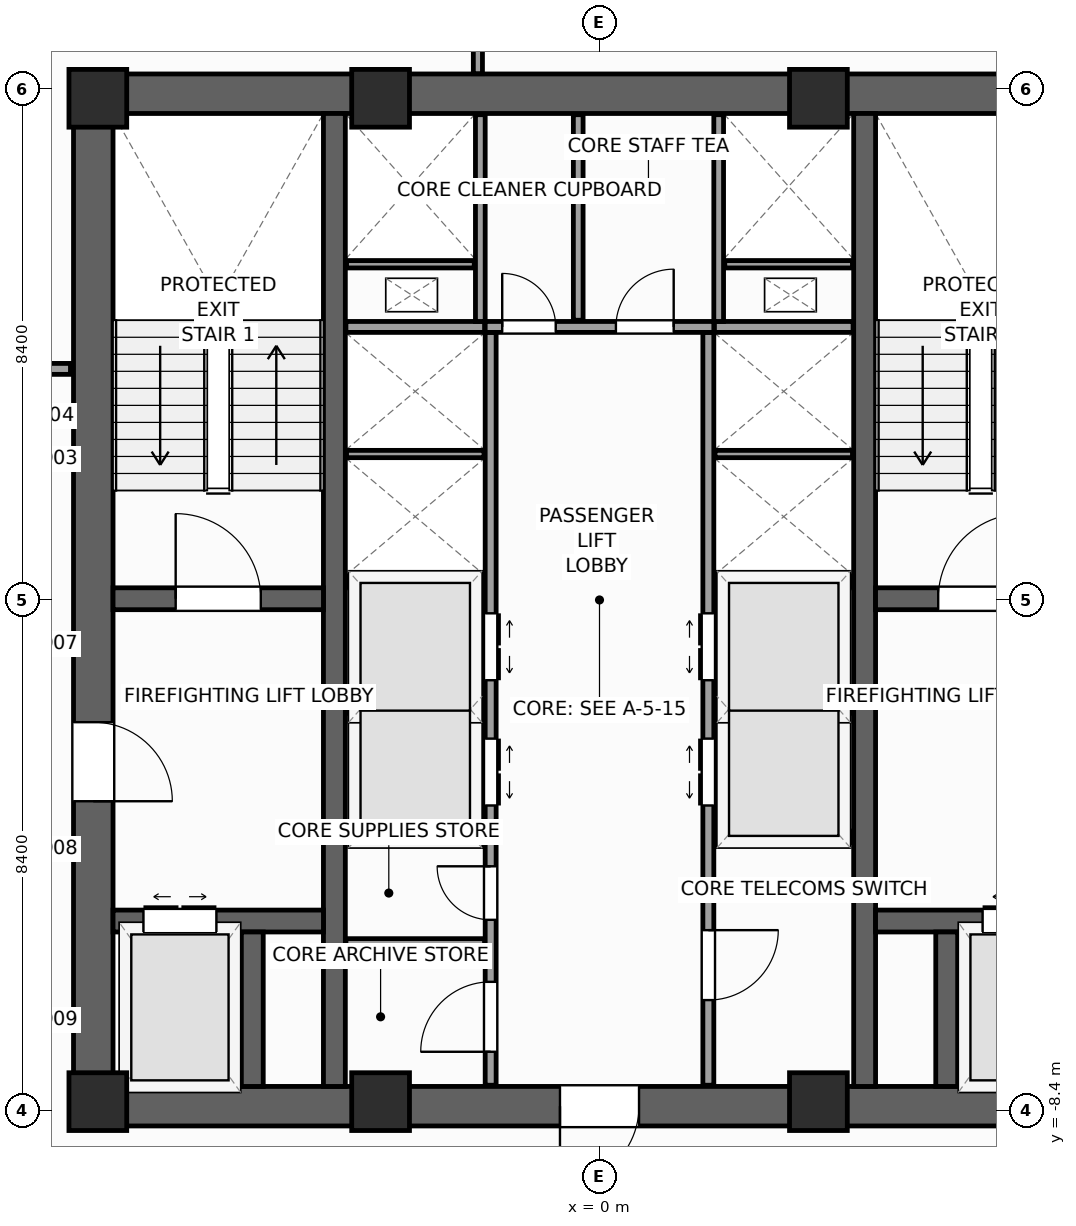
"""IFC4 building model, lengths in metres.
Left out: names, types, materials, properties, quantities, classifications, styles, units other than length and angle.
Written with IfcOpenShell. Run it as: python <this file> out.ifc"""

import sys

from ifc_helpers import new_model, si_unit, direction, frame, frame_2d, origin, origin_2d, place, context, subcontext, project, spatial, rectangle, extrude, source, transform, mapped, element, fill, save


model = new_model("IFC4")
c1 = context("Model", 3, precision=1e-05, world=origin(), true_north=direction((0.0, 1.0)))
c2 = subcontext(c1, "Body", "Model", "MODEL_VIEW")
j1 = project(units=[si_unit("LENGTHUNIT", "METRE"), si_unit("PLANEANGLEUNIT", "RADIAN")], contexts=[c1])
p1 = place(None, origin())
s1 = spatial("IfcSite", under=j1, at=p1, CompositionType="ELEMENT")
p2 = place(p1, origin())
s2 = spatial("IfcBuilding", under=s1, at=p2, CompositionType="ELEMENT")
p3 = place(p2, frame((0.0, 0.0, 180.4)))
s3 = spatial("IfcBuildingStorey", under=s2, at=p3, CompositionType="ELEMENT", Elevation=180.4)
p4 = place(p3, frame((-8.65, -8.325, 0.0), z_axis=(0.0, 0.0, 1.0), x_axis=(1.0, 0.0, 0.0)))
e1 = element("IfcWall", 1, at=p4, inside=s3, PredefinedType="SHEAR", context=c2, shape_type="SweptSolid", body=[
    extrude(rectangle(XDim=17.3, YDim=0.65, at=frame_2d((8.65, 0.0))), origin(), (0.0, 0.0, 1.0), 4.0),
])
p5 = place(p4, frame((8.0, 0.0, 0.0)))
e2 = element("IfcOpeningElement", 2, at=p5, cuts=e1, PredefinedType="OPENING", context=c2, shape_type="SweptSolid", body=[
    extrude(rectangle(XDim=1.3, YDim=2.2, at=frame_2d((0.65, 1.1))), frame((0.0, 0.335, 0.0), z_axis=(0.0, -1.0, 0.0), x_axis=(1.0, 0.0, 0.0)), (0.0, 0.0, 1.0), 0.67),
])
p6 = place(p3, frame((-8.65, 8.325, 0.0), z_axis=(0.0, 0.0, 1.0), x_axis=(1.0, 0.0, 0.0)))
e3 = element("IfcWall", 3, at=p6, inside=s3, PredefinedType="SHEAR", context=c2, shape_type="SweptSolid", body=[
    extrude(rectangle(XDim=17.3, YDim=0.65, at=frame_2d((8.65, 0.0))), origin(), (0.0, 0.0, 1.0), 4.0),
])
p7 = place(p3, frame((-8.325, -8.0, 0.0), z_axis=(0.0, 0.0, 1.0), x_axis=(0.0, 1.0, 0.0)))
e4 = element("IfcWall", 4, at=p7, inside=s3, PredefinedType="SHEAR", context=c2, shape_type="SweptSolid", body=[
    extrude(rectangle(XDim=16.0, YDim=0.65, at=frame_2d((8.0, 0.0))), origin(), (0.0, 0.0, 1.0), 4.0),
])
p8 = place(p7, frame((4.69, 0.0, 0.0)))
e5 = element("IfcOpeningElement", 5, at=p8, cuts=e4, PredefinedType="OPENING", context=c2, shape_type="SweptSolid", body=[
    extrude(rectangle(XDim=1.3, YDim=2.2, at=frame_2d((0.65, 1.1))), frame((0.0, 0.335, 0.0), z_axis=(0.0, -1.0, 0.0), x_axis=(1.0, 0.0, 0.0)), (0.0, 0.0, 1.0), 0.67),
])
for number, where, z_axis, x_axis in (
    (6, (-4.36, -8.0, 0.0), (0.0, 0.0, 1.0), (0.0, 1.0, 0.0)),
    (7, (4.36, -8.0, 0.0), (0.0, 0.0, 1.0), (0.0, 1.0, 0.0)),
):
    element("IfcWall", number, at=place(p3, frame(where, z_axis=z_axis, x_axis=x_axis)), inside=s3, PredefinedType="SHEAR", context=c2, shape_type="SweptSolid", body=[
        extrude(rectangle(XDim=16.0, YDim=0.36, at=frame_2d((8.0, 0.0))), origin(), (0.0, 0.0, 1.0), 4.0),
    ])
p9 = place(p3, frame((-8.0, 0.02, 0.0), z_axis=(0.0, 0.0, 1.0), x_axis=(1.0, 0.0, 0.0)))
e8 = element("IfcWall", 8, at=p9, inside=s3, PredefinedType="SHEAR", context=c2, shape_type="SweptSolid", body=[
    extrude(rectangle(XDim=3.46, YDim=0.36, at=frame_2d((1.73, 0.0))), origin(), (0.0, 0.0, 1.0), 4.0),
])
p10 = place(p9, frame((1.03, 0.0, 0.0)))
e9 = element("IfcOpeningElement", 9, at=p10, cuts=e8, PredefinedType="OPENING", context=c2, shape_type="SweptSolid", body=[
    extrude(rectangle(XDim=1.4, YDim=2.2, at=frame_2d((0.7, 1.1))), frame((0.0, 0.19, 0.0), z_axis=(0.0, -1.0, 0.0), x_axis=(1.0, 0.0, 0.0)), (0.0, 0.0, 1.0), 0.38),
])
p11 = place(p3, frame((4.54, 0.02, 0.0), z_axis=(0.0, 0.0, 1.0), x_axis=(1.0, 0.0, 0.0)))
e10 = element("IfcWall", 10, at=p11, inside=s3, PredefinedType="SHEAR", context=c2, shape_type="SweptSolid", body=[
    extrude(rectangle(XDim=3.46, YDim=0.36, at=frame_2d((1.73, 0.0))), origin(), (0.0, 0.0, 1.0), 4.0),
])
p12 = place(p11, frame((1.03, 0.0, 0.0)))
e11 = element("IfcOpeningElement", 11, at=p12, cuts=e10, PredefinedType="OPENING", context=c2, shape_type="SweptSolid", body=[
    extrude(rectangle(XDim=1.4, YDim=2.2, at=frame_2d((0.7, 1.1))), frame((0.0, 0.19, 0.0), z_axis=(0.0, -1.0, 0.0), x_axis=(1.0, 0.0, 0.0)), (0.0, 0.0, 1.0), 0.38),
])
p13 = place(p3, frame((-8.0, -5.28, 0.0), z_axis=(0.0, 0.0, 1.0), x_axis=(1.0, 0.0, 0.0)))
e12 = element("IfcWall", 12, at=p13, inside=s3, PredefinedType="SHEAR", context=c2, shape_type="SweptSolid", body=[
    extrude(rectangle(XDim=3.46, YDim=0.36, at=frame_2d((1.73, 0.0))), origin(), (0.0, 0.0, 1.0), 4.0),
])
p14 = place(p13, frame((0.5, 0.0, 0.0)))
e13 = element("IfcOpeningElement", 13, at=p14, cuts=e12, PredefinedType="OPENING", context=c2, shape_type="SweptSolid", body=[
    extrude(rectangle(XDim=1.2, YDim=2.25, at=frame_2d((0.6, 1.125))), frame((0.0, 0.19, 0.0), z_axis=(0.0, -1.0, 0.0), x_axis=(1.0, 0.0, 0.0)), (0.0, 0.0, 1.0), 0.38),
])
p15 = place(p3, frame((4.54, -5.28, 0.0), z_axis=(0.0, 0.0, 1.0), x_axis=(1.0, 0.0, 0.0)))
e14 = element("IfcWall", 14, at=p15, inside=s3, PredefinedType="SHEAR", context=c2, shape_type="SweptSolid", body=[
    extrude(rectangle(XDim=3.46, YDim=0.36, at=frame_2d((1.73, 0.0))), origin(), (0.0, 0.0, 1.0), 4.0),
])
p16 = place(p15, frame((1.76, 0.0, 0.0)))
e15 = element("IfcOpeningElement", 15, at=p16, cuts=e14, PredefinedType="OPENING", context=c2, shape_type="SweptSolid", body=[
    extrude(rectangle(XDim=1.2, YDim=2.25, at=frame_2d((0.6, 1.125))), frame((0.0, 0.19, 0.0), z_axis=(0.0, -1.0, 0.0), x_axis=(1.0, 0.0, 0.0)), (0.0, 0.0, 1.0), 0.38),
])
for number, where, z_axis, x_axis in (
    (16, (-5.71, -8.0, 0.0), (0.0, 0.0, 1.0), (0.0, 1.0, 0.0)),
    (17, (5.71, -8.0, 0.0), (0.0, 0.0, 1.0), (0.0, 1.0, 0.0)),
):
    element("IfcWall", number, at=place(p3, frame(where, z_axis=z_axis, x_axis=x_axis)), inside=s3, PredefinedType="SHEAR", context=c2, shape_type="SweptSolid", body=[
        extrude(rectangle(XDim=2.54, YDim=0.36, at=frame_2d((1.27, 0.0))), origin(), (0.0, 0.0, 1.0), 4.0),
    ])
m1 = source(origin(), c2, "Body", "SweptSolid", [
    extrude(rectangle(XDim=0.95, YDim=0.95, at=origin_2d()), origin(), (0.0, 0.0, 1.0), 4.0),
])
for number, where, z_axis, x_axis in (
    (18, (-8.25, -8.25, 0.0), (0.0, 0.0, 1.0), (1.0, 0.0, 0.0)),
    (19, (-8.25, 8.25, 0.0), (0.0, 0.0, 1.0), (1.0, 0.0, 0.0)),
    (20, (-3.6, -8.25, 0.0), (0.0, 0.0, 1.0), (1.0, 0.0, 0.0)),
    (21, (3.6, -8.25, 0.0), (0.0, 0.0, 1.0), (1.0, 0.0, 0.0)),
    (22, (-3.6, 8.25, 0.0), (0.0, 0.0, 1.0), (1.0, 0.0, 0.0)),
    (23, (3.6, 8.25, 0.0), (0.0, 0.0, 1.0), (1.0, 0.0, 0.0)),
):
    element("IfcColumn", number, at=place(p3, frame(where, z_axis=z_axis, x_axis=x_axis)), inside=s3, PredefinedType="PILASTER", context=c2, shape_type="MappedRepresentation", body=[
        mapped(m1, transform((0.0, 0.0, 0.0), scale=1.0)),
    ])
p17 = place(p3, frame((-1.79, -7.98, 0.0), z_axis=(0.0, 0.0, 1.0), x_axis=(0.0, 1.0, 0.0)))
e24 = element("IfcWall", 24, at=p17, inside=s3, PredefinedType="PARTITIONING", context=c2, shape_type="SweptSolid", body=[
    extrude(rectangle(XDim=12.38, YDim=0.18, at=frame_2d((6.19, 0.0))), origin(), (0.0, 0.0, 1.0), 3.74),
])
p18 = place(p17, frame((4.6, 0.0, 0.0)))
e25 = element("IfcOpeningElement", 25, at=p18, cuts=e24, PredefinedType="OPENING", context=c2, shape_type="SweptSolid", body=[
    extrude(rectangle(XDim=1.1, YDim=2.2, at=frame_2d((0.55, 1.1))), frame((0.0, 0.1, 0.0), z_axis=(0.0, -1.0, 0.0), x_axis=(1.0, 0.0, 0.0)), (0.0, 0.0, 1.0), 0.2),
])
p19 = place(p17, frame((6.66, 0.0, 0.0)))
e26 = element("IfcOpeningElement", 26, at=p19, cuts=e24, PredefinedType="OPENING", context=c2, shape_type="SweptSolid", body=[
    extrude(rectangle(XDim=1.1, YDim=2.2, at=frame_2d((0.55, 1.1))), frame((0.0, 0.1, 0.0), z_axis=(0.0, -1.0, 0.0), x_axis=(1.0, 0.0, 0.0)), (0.0, 0.0, 1.0), 0.2),
])
p20 = place(p17, frame((0.55, 0.0, 0.0)))
e27 = element("IfcOpeningElement", 27, at=p20, cuts=e24, PredefinedType="OPENING", context=c2, shape_type="SweptSolid", body=[
    extrude(rectangle(XDim=1.15, YDim=2.25, at=frame_2d((0.575, 1.125))), frame((0.0, 0.1, 0.0), z_axis=(0.0, -1.0, 0.0), x_axis=(1.0, 0.0, 0.0)), (0.0, 0.0, 1.0), 0.2),
])
p21 = place(p17, frame((2.72, 0.0, 0.0)))
e28 = element("IfcOpeningElement", 28, at=p21, cuts=e24, PredefinedType="OPENING", context=c2, shape_type="SweptSolid", body=[
    extrude(rectangle(XDim=0.88, YDim=2.1, at=frame_2d((0.44, 1.05))), frame((0.0, 0.1, 0.0), z_axis=(0.0, -1.0, 0.0), x_axis=(1.0, 0.0, 0.0)), (0.0, 0.0, 1.0), 0.2),
])
p22 = place(p3, frame((1.79, -7.98, 0.0), z_axis=(0.0, 0.0, 1.0), x_axis=(0.0, 1.0, 0.0)))
e29 = element("IfcWall", 29, at=p22, inside=s3, PredefinedType="PARTITIONING", context=c2, shape_type="SweptSolid", body=[
    extrude(rectangle(XDim=12.38, YDim=0.18, at=frame_2d((6.19, 0.0))), origin(), (0.0, 0.0, 1.0), 3.74),
])
p23 = place(p22, frame((4.6, 0.0, 0.0)))
e30 = element("IfcOpeningElement", 30, at=p23, cuts=e29, PredefinedType="OPENING", context=c2, shape_type="SweptSolid", body=[
    extrude(rectangle(XDim=1.1, YDim=2.2, at=frame_2d((0.55, 1.1))), frame((0.0, 0.1, 0.0), z_axis=(0.0, -1.0, 0.0), x_axis=(1.0, 0.0, 0.0)), (0.0, 0.0, 1.0), 0.2),
])
p24 = place(p22, frame((6.66, 0.0, 0.0)))
e31 = element("IfcOpeningElement", 31, at=p24, cuts=e29, PredefinedType="OPENING", context=c2, shape_type="SweptSolid", body=[
    extrude(rectangle(XDim=1.1, YDim=2.2, at=frame_2d((0.55, 1.1))), frame((0.0, 0.1, 0.0), z_axis=(0.0, -1.0, 0.0), x_axis=(1.0, 0.0, 0.0)), (0.0, 0.0, 1.0), 0.2),
])
p25 = place(p22, frame((1.4, 0.0, 0.0)))
e32 = element("IfcOpeningElement", 32, at=p25, cuts=e29, PredefinedType="OPENING", context=c2, shape_type="SweptSolid", body=[
    extrude(rectangle(XDim=1.15, YDim=2.25, at=frame_2d((0.575, 1.125))), frame((0.0, 0.1, 0.0), z_axis=(0.0, -1.0, 0.0), x_axis=(1.0, 0.0, 0.0)), (0.0, 0.0, 1.0), 0.2),
])
p26 = place(p3, frame((-1.88, 4.49, 0.0), z_axis=(0.0, 0.0, 1.0), x_axis=(1.0, 0.0, 0.0)))
e33 = element("IfcWall", 33, at=p26, inside=s3, PredefinedType="PARTITIONING", context=c2, shape_type="SweptSolid", body=[
    extrude(rectangle(XDim=3.76, YDim=0.18, at=frame_2d((1.88, 0.0))), origin(), (0.0, 0.0, 1.0), 3.74),
])
p27 = place(p26, frame((0.28, 0.0, 0.0)))
e34 = element("IfcOpeningElement", 34, at=p27, cuts=e33, PredefinedType="OPENING", context=c2, shape_type="SweptSolid", body=[
    extrude(rectangle(XDim=0.88, YDim=2.1, at=frame_2d((0.44, 1.05))), frame((0.0, 0.1, 0.0), z_axis=(0.0, -1.0, 0.0), x_axis=(1.0, 0.0, 0.0)), (0.0, 0.0, 1.0), 0.2),
])
p28 = place(p26, frame((2.15, 0.0, 0.0)))
e35 = element("IfcOpeningElement", 35, at=p28, cuts=e33, PredefinedType="OPENING", context=c2, shape_type="SweptSolid", body=[
    extrude(rectangle(XDim=0.95, YDim=2.1, at=frame_2d((0.475, 1.05))), frame((0.0, 0.1, 0.0), z_axis=(0.0, -1.0, 0.0), x_axis=(1.0, 0.0, 0.0)), (0.0, 0.0, 1.0), 0.2),
])
for number, where, z_axis, x_axis in (
    (36, (-4.17, -3.9, 0.0), (0.0, 0.0, 1.0), (1.0, 0.0, 0.0)),
    (37, (1.89, -3.9, 0.0), (0.0, 0.0, 1.0), (1.0, 0.0, 0.0)),
    (38, (-4.17, 0.3, 0.0), (0.0, 0.0, 1.0), (1.0, 0.0, 0.0)),
    (39, (1.89, 0.3, 0.0), (0.0, 0.0, 1.0), (1.0, 0.0, 0.0)),
    (40, (-4.17, 4.49, 0.0), (0.0, 0.0, 1.0), (1.0, 0.0, 0.0)),
    (41, (1.89, 4.49, 0.0), (0.0, 0.0, 1.0), (1.0, 0.0, 0.0)),
):
    element("IfcWall", number, at=place(p3, frame(where, z_axis=z_axis, x_axis=x_axis)), inside=s3, PredefinedType="PARTITIONING", context=c2, shape_type="SweptSolid", body=[
        extrude(rectangle(XDim=2.28, YDim=0.18, at=frame_2d((1.14, 0.0))), origin(), (0.0, 0.0, 1.0), 3.74),
    ])
for number, where, z_axis, x_axis in (
    (42, (-4.16, -1.8, 0.0), (0.0, 0.0, 1.0), (1.0, 0.0, 0.0)),
    (43, (1.9, -1.8, 0.0), (0.0, 0.0, 1.0), (1.0, 0.0, 0.0)),
    (44, (-4.16, 2.4, 0.0), (0.0, 0.0, 1.0), (1.0, 0.0, 0.0)),
    (45, (1.9, 2.4, 0.0), (0.0, 0.0, 1.0), (1.0, 0.0, 0.0)),
):
    element("IfcWall", number, at=place(p3, frame(where, z_axis=z_axis, x_axis=x_axis)), inside=s3, PredefinedType="PARTITIONING", context=c2, shape_type="SweptSolid", body=[
        extrude(rectangle(XDim=2.26, YDim=0.12, at=frame_2d((1.13, 0.0))), origin(), (0.0, 0.0, 1.0), 3.74),
    ])
p29 = place(p3, frame((-4.17, -5.65, 0.0), z_axis=(0.0, 0.0, 1.0), x_axis=(1.0, 0.0, 0.0)))
e46 = element("IfcWall", 46, at=p29, inside=s3, PredefinedType="PARTITIONING", context=c2, shape_type="SweptSolid", body=[
    extrude(rectangle(XDim=2.28, YDim=0.16, at=frame_2d((1.14, 0.0))), origin(), (0.0, 0.0, 1.0), 3.74),
])
for number, where, z_axis, x_axis in (
    (47, (-1.96, 4.58, 0.0), (0.0, 0.0, 1.0), (0.0, 1.0, 0.0)),
    (48, (1.96, 4.58, 0.0), (0.0, 0.0, 1.0), (0.0, 1.0, 0.0)),
):
    element("IfcWall", number, at=place(p3, frame(where, z_axis=z_axis, x_axis=x_axis)), inside=s3, PredefinedType="PARTITIONING", context=c2, shape_type="SweptSolid", body=[
        extrude(rectangle(XDim=3.4, YDim=0.16, at=frame_2d((1.7, 0.0))), origin(), (0.0, 0.0, 1.0), 3.74),
    ])
for number, where, z_axis, x_axis in (
    (49, (-4.16, 5.52, 0.0), (0.0, 0.0, 1.0), (1.0, 0.0, 0.0)),
    (50, (2.06, 5.52, 0.0), (0.0, 0.0, 1.0), (1.0, 0.0, 0.0)),
):
    element("IfcWall", number, at=place(p3, frame(where, z_axis=z_axis, x_axis=x_axis)), inside=s3, PredefinedType="PARTITIONING", context=c2, shape_type="SweptSolid", body=[
        extrude(rectangle(XDim=2.1, YDim=0.12, at=frame_2d((1.05, 0.0))), origin(), (0.0, 0.0, 1.0), 3.74),
    ])
p30 = place(p3, frame((-0.35, 4.6, 0.0), z_axis=(0.0, 0.0, 1.0), x_axis=(0.0, 1.0, 0.0)))
e51 = element("IfcWall", 51, at=p30, inside=s3, PredefinedType="PARTITIONING", context=c2, shape_type="SweptSolid", body=[
    extrude(rectangle(XDim=3.38, YDim=0.16, at=frame_2d((1.69, 0.0))), origin(), (0.0, 0.0, 1.0), 3.74),
])
p31 = place(p3, frame((-10.45, 3.8, 0.0), z_axis=(0.0, 0.0, 1.0), x_axis=(1.0, 0.0, 0.0)))
e52 = element("IfcWall", 52, at=p31, inside=s3, PredefinedType="PARTITIONING", context=c2, shape_type="SweptSolid", body=[
    extrude(rectangle(XDim=1.75, YDim=0.18, at=frame_2d((0.875, 0.0))), origin(), (0.0, 0.0, 1.0), 3.74),
])
p32 = place(p31, frame((0.325, 0.0, 0.0)))
e53 = element("IfcOpeningElement", 53, at=p32, cuts=e52, PredefinedType="OPENING", context=c2, shape_type="SweptSolid", body=[
    extrude(rectangle(XDim=1.1, YDim=2.2, at=frame_2d((0.55, 1.1))), frame((0.0, 0.1, 0.0), z_axis=(0.0, -1.0, 0.0), x_axis=(1.0, 0.0, 0.0)), (0.0, 0.0, 1.0), 0.2),
])
p33 = place(p3, frame((-2.0, 8.655, 0.0), z_axis=(0.0, 0.0, 1.0), x_axis=(0.0, 1.0, 0.0)))
e54 = element("IfcWall", 54, at=p33, inside=s3, PredefinedType="PARTITIONING", context=c2, shape_type="SweptSolid", body=[
    extrude(rectangle(XDim=20.423, YDim=0.15, at=frame_2d((10.211, 0.0))), origin(), (0.0, 0.0, 1.0), 3.74),
])
m2 = source(origin(), c2, "Body", "SweptSolid", [
    extrude(rectangle(XDim=1.4, YDim=2.2, at=frame_2d((0.7, 1.1))), frame((0.0, 0.025, 0.0), z_axis=(0.0, -1.0, 0.0), x_axis=(1.0, 0.0, 0.0)), (0.0, 0.0, 1.0), 0.05),
])
p34 = place(p10, origin())
e55 = element("IfcDoor", 55, at=p34, inside=s3, OperationType="SINGLE_SWING_LEFT", PredefinedType="DOOR", context=c2, shape_type="MappedRepresentation", body=[
    mapped(m2, transform((0.0, 0.0, 0.0), scale=1.0)),
])
fill(e9, e55)
p35 = place(p12, origin())
e56 = element("IfcDoor", 56, at=p35, inside=s3, OperationType="SINGLE_SWING_RIGHT", PredefinedType="DOOR", context=c2, shape_type="MappedRepresentation", body=[
    mapped(m2, transform((0.0, 0.0, 0.0), scale=1.0)),
])
fill(e11, e56)
m3 = source(origin(), c2, "Body", "SweptSolid", [
    extrude(rectangle(XDim=1.3, YDim=2.2, at=frame_2d((0.65, 1.1))), frame((0.0, 0.025, 0.0), z_axis=(0.0, -1.0, 0.0), x_axis=(1.0, 0.0, 0.0)), (0.0, 0.0, 1.0), 0.05),
])
p36 = place(p8, frame((1.3, 0.0, 0.0), z_axis=(0.0, 0.0, 1.0), x_axis=(-1.0, 0.0, 0.0)))
e57 = element("IfcDoor", 57, at=p36, inside=s3, OperationType="SINGLE_SWING_LEFT", PredefinedType="DOOR", context=c2, shape_type="MappedRepresentation", body=[
    mapped(m3, transform((0.0, 0.0, 0.0), scale=1.0)),
])
fill(e5, e57)
p37 = place(p5, frame((1.3, 0.0, 0.0), z_axis=(0.0, 0.0, 1.0), x_axis=(-1.0, 0.0, 0.0)))
e58 = element("IfcDoor", 58, at=p37, inside=s3, OperationType="SINGLE_SWING_LEFT", PredefinedType="DOOR", context=c2, shape_type="MappedRepresentation", body=[
    mapped(m3, transform((0.0, 0.0, 0.0), scale=1.0)),
])
fill(e2, e58)
m4 = source(origin(), c2, "Body", "SweptSolid", [
    extrude(rectangle(XDim=1.2, YDim=2.25, at=frame_2d((0.6, 1.125))), frame((0.0, 0.025, 0.0), z_axis=(0.0, -1.0, 0.0), x_axis=(1.0, 0.0, 0.0)), (0.0, 0.0, 1.0), 0.05),
])
p38 = place(p14, origin())
e59 = element("IfcDoor", 59, at=p38, inside=s3, OperationType="DOUBLE_DOOR_SLIDING", PredefinedType="DOOR", context=c2, shape_type="MappedRepresentation", body=[
    mapped(m4, transform((0.0, 0.0, 0.0), scale=1.0)),
])
fill(e13, e59)
p39 = place(p16, origin())
e60 = element("IfcDoor", 60, at=p39, inside=s3, OperationType="DOUBLE_DOOR_SLIDING", PredefinedType="DOOR", context=c2, shape_type="MappedRepresentation", body=[
    mapped(m4, transform((0.0, 0.0, 0.0), scale=1.0)),
])
fill(e15, e60)
m5 = source(origin(), c2, "Body", "SweptSolid", [
    extrude(rectangle(XDim=1.1, YDim=2.2, at=frame_2d((0.55, 1.1))), frame((0.0, 0.025, 0.0), z_axis=(0.0, -1.0, 0.0), x_axis=(1.0, 0.0, 0.0)), (0.0, 0.0, 1.0), 0.05),
])
p40 = place(p18, frame((1.1, 0.0, 0.0), z_axis=(0.0, 0.0, 1.0), x_axis=(-1.0, 0.0, 0.0)))
e61 = element("IfcDoor", 61, at=p40, inside=s3, OperationType="DOUBLE_DOOR_SLIDING", PredefinedType="DOOR", context=c2, shape_type="MappedRepresentation", body=[
    mapped(m5, transform((0.0, 0.0, 0.0), scale=1.0)),
])
fill(e25, e61)
p41 = place(p19, frame((1.1, 0.0, 0.0), z_axis=(0.0, 0.0, 1.0), x_axis=(-1.0, 0.0, 0.0)))
e62 = element("IfcDoor", 62, at=p41, inside=s3, OperationType="DOUBLE_DOOR_SLIDING", PredefinedType="DOOR", context=c2, shape_type="MappedRepresentation", body=[
    mapped(m5, transform((0.0, 0.0, 0.0), scale=1.0)),
])
fill(e26, e62)
p42 = place(p23, origin())
e63 = element("IfcDoor", 63, at=p42, inside=s3, OperationType="DOUBLE_DOOR_SLIDING", PredefinedType="DOOR", context=c2, shape_type="MappedRepresentation", body=[
    mapped(m5, transform((0.0, 0.0, 0.0), scale=1.0)),
])
fill(e30, e63)
p43 = place(p24, origin())
e64 = element("IfcDoor", 64, at=p43, inside=s3, OperationType="DOUBLE_DOOR_SLIDING", PredefinedType="DOOR", context=c2, shape_type="MappedRepresentation", body=[
    mapped(m5, transform((0.0, 0.0, 0.0), scale=1.0)),
])
fill(e31, e64)
m6 = source(origin(), c2, "Body", "SweptSolid", [
    extrude(rectangle(XDim=1.15, YDim=2.25, at=frame_2d((0.575, 1.125))), frame((0.0, 0.025, 0.0), z_axis=(0.0, -1.0, 0.0), x_axis=(1.0, 0.0, 0.0)), (0.0, 0.0, 1.0), 0.05),
])
p44 = place(p20, origin())
e65 = element("IfcDoor", 65, at=p44, inside=s3, OperationType="SINGLE_SWING_LEFT", PredefinedType="DOOR", context=c2, shape_type="MappedRepresentation", body=[
    mapped(m6, transform((0.0, 0.0, 0.0), scale=1.0)),
])
fill(e27, e65)
m7 = source(origin(), c2, "Body", "SweptSolid", [
    extrude(rectangle(XDim=0.88, YDim=2.1, at=frame_2d((0.44, 1.05))), frame((0.0, 0.025, 0.0), z_axis=(0.0, -1.0, 0.0), x_axis=(1.0, 0.0, 0.0)), (0.0, 0.0, 1.0), 0.05),
])
p45 = place(p21, origin())
e66 = element("IfcDoor", 66, at=p45, inside=s3, OperationType="SINGLE_SWING_RIGHT", PredefinedType="DOOR", context=c2, shape_type="MappedRepresentation", body=[
    mapped(m7, transform((0.0, 0.0, 0.0), scale=1.0)),
])
fill(e28, e66)
p46 = place(p25, frame((1.15, 0.0, 0.0), z_axis=(0.0, 0.0, 1.0), x_axis=(-1.0, 0.0, 0.0)))
e67 = element("IfcDoor", 67, at=p46, inside=s3, OperationType="SINGLE_SWING_RIGHT", PredefinedType="DOOR", context=c2, shape_type="MappedRepresentation", body=[
    mapped(m6, transform((0.0, 0.0, 0.0), scale=1.0)),
])
fill(e32, e67)
p47 = place(p27, origin())
e68 = element("IfcDoor", 68, at=p47, inside=s3, OperationType="SINGLE_SWING_LEFT", PredefinedType="DOOR", context=c2, shape_type="MappedRepresentation", body=[
    mapped(m7, transform((0.0, 0.0, 0.0), scale=1.0)),
])
fill(e34, e68)
m8 = source(origin(), c2, "Body", "SweptSolid", [
    extrude(rectangle(XDim=0.95, YDim=2.1, at=frame_2d((0.475, 1.05))), frame((0.0, 0.025, 0.0), z_axis=(0.0, -1.0, 0.0), x_axis=(1.0, 0.0, 0.0)), (0.0, 0.0, 1.0), 0.05),
])
p48 = place(p28, origin())
e69 = element("IfcDoor", 69, at=p48, inside=s3, OperationType="SINGLE_SWING_RIGHT", PredefinedType="DOOR", context=c2, shape_type="MappedRepresentation", body=[
    mapped(m8, transform((0.0, 0.0, 0.0), scale=1.0)),
])
fill(e35, e69)
save(model, sys.argv[1])
